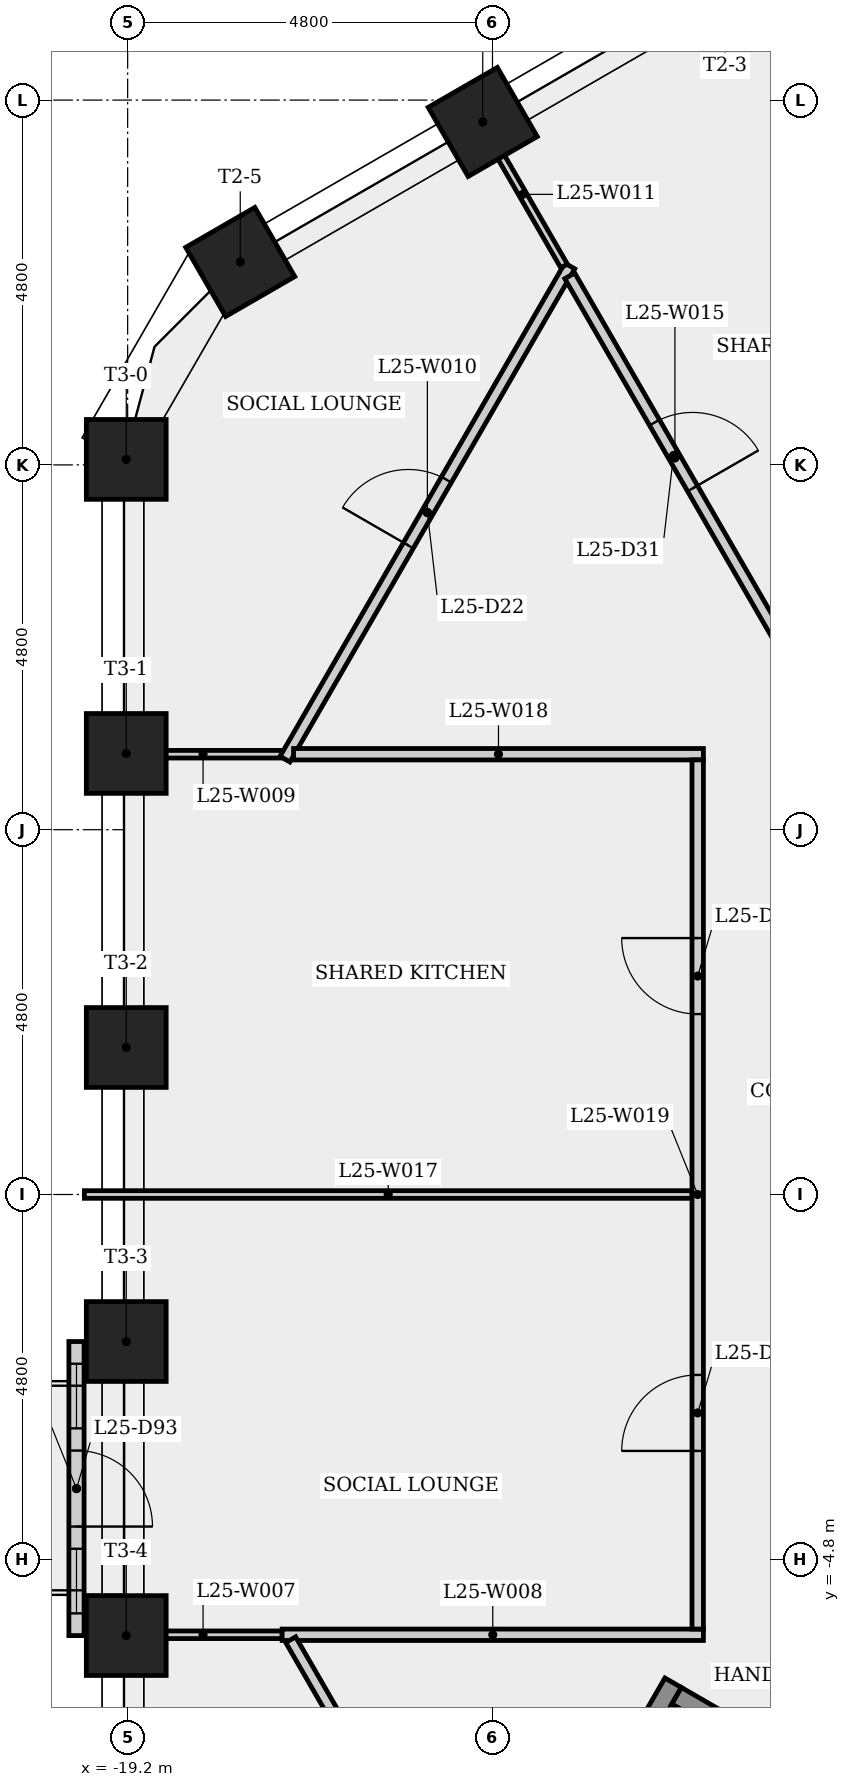
"""IFC4 building model, lengths in metres.
Left out: names, types, materials, properties, quantities, classifications, styles, units other than length and angle.
Written with IfcOpenShell. Run it as: python <this file> out.ifc"""

import sys

from ifc_helpers import new_model, si_unit, direction, frame, frame_2d, origin, origin_2d, place, context, subcontext, project, spatial, rectangle, extrude, element, fill, save


model = new_model("IFC4")
c1 = context("Model", 3, precision=1e-05, world=origin(), true_north=direction((0.0, 1.0)))
c2 = subcontext(c1, "Body", "Model", "MODEL_VIEW")
j1 = project(units=[si_unit("LENGTHUNIT", "METRE"), si_unit("PLANEANGLEUNIT", "RADIAN")], contexts=[c1])
p1 = place(None, origin())
s1 = spatial("IfcSite", under=j1, at=p1, CompositionType="ELEMENT")
p2 = place(p1, origin())
s2 = spatial("IfcBuilding", under=s1, at=p2, CompositionType="ELEMENT")
p3 = place(p2, frame((0.0, 0.0, 96.7)))
s3 = spatial("IfcBuildingStorey", under=s2, at=p3, CompositionType="ELEMENT", Elevation=96.7)
for number, where, z_axis, x_axis in (
    (1, (-14.528, 14.112, 0.0), (0.0, 0.0, 1.0), (-0.5, 0.866, 0.0)),
    (2, (-17.719, 12.27, 0.0), (0.0, 0.0, 1.0), (-0.5, 0.866, 0.0)),
    (3, (-19.219, 9.672, 0.0), (0.0, 0.0, 1.0), (-1.0, 0.0, 0.0)),
    (4, (-19.219, 5.803, 0.0), (0.0, 0.0, 1.0), (-1.0, 0.0, 0.0)),
    (5, (-19.219, 1.934, 0.0), (0.0, 0.0, 1.0), (-1.0, 0.0, 0.0)),
    (6, (-19.219, -1.934, 0.0), (0.0, 0.0, 1.0), (-1.0, 0.0, 0.0)),
    (7, (-19.219, -5.803, 0.0), (0.0, 0.0, 1.0), (-1.0, 0.0, 0.0)),
):
    element("IfcColumn", number, at=place(p3, frame(where, z_axis=z_axis, x_axis=x_axis)), inside=s3, PredefinedType="COLUMN", context=c2, shape_type="SweptSolid", body=[
        extrude(rectangle(XDim=1.05, YDim=1.05, at=origin_2d()), origin(), (0.0, 0.0, 1.0), 3.4),
    ])
p4 = place(p3, frame((-19.873, -1.935, 0.0), z_axis=(0.0, 0.0, 1.0), x_axis=(0.0, -1.0, 0.0)))
e8 = element("IfcWall", 8, at=p4, inside=s3, PredefinedType="SOLIDWALL", context=c2, shape_type="SweptSolid", body=[
    extrude(rectangle(XDim=3.869, YDim=0.2, at=frame_2d((1.935, 0.0))), origin(), (0.0, 0.0, 1.0), 3.4),
])
p5 = place(p4, frame((1.435, 0.0, 0.0)))
e9 = element("IfcOpeningElement", 9, at=p5, cuts=e8, PredefinedType="OPENING", context=c2, shape_type="SweptSolid", body=[
    extrude(rectangle(XDim=1.0, YDim=2.4, at=frame_2d((0.5, 1.2))), frame((0.0, 0.11, 0.0), z_axis=(0.0, -1.0, 0.0), x_axis=(1.0, 0.0, 0.0)), (0.0, 0.0, 1.0), 0.22),
])
p6 = place(p4, frame((0.292, 0.0, 0.9)))
e10 = element("IfcOpeningElement", 10, at=p6, cuts=e8, PredefinedType="OPENING", context=c2, shape_type="SweptSolid", body=[
    extrude(rectangle(XDim=0.85, YDim=1.5, at=frame_2d((0.425, 0.75))), frame((0.0, 0.11, 0.0), z_axis=(0.0, -1.0, 0.0), x_axis=(1.0, 0.0, 0.0)), (0.0, 0.0, 1.0), 0.22),
])
p7 = place(p4, frame((2.727, 0.0, 0.9)))
e11 = element("IfcOpeningElement", 11, at=p7, cuts=e8, PredefinedType="OPENING", context=c2, shape_type="SweptSolid", body=[
    extrude(rectangle(XDim=0.85, YDim=1.5, at=frame_2d((0.425, 0.75))), frame((0.0, 0.11, 0.0), z_axis=(0.0, -1.0, 0.0), x_axis=(1.0, 0.0, 0.0)), (0.0, 0.0, 1.0), 0.22),
])
p8 = place(p3, frame((-17.167, -5.793, 0.0), z_axis=(0.0, 0.0, 1.0), x_axis=(-1.0, 0.0, 0.0)))
e12 = element("IfcWall", 12, at=p8, inside=s3, PredefinedType="PARTITIONING", context=c2, shape_type="SweptSolid", body=[
    extrude(rectangle(XDim=2.081, YDim=0.1, at=frame_2d((1.041, 0.0))), origin(), (0.0, 0.0, 1.0), 3.05),
])
p9 = place(p3, frame((-17.167, -5.793, 0.0), z_axis=(0.0, 0.0, 1.0), x_axis=(1.0, 0.0, 0.0)))
e13 = element("IfcWall", 13, at=p9, inside=s3, PredefinedType="PARTITIONING", context=c2, shape_type="SweptSolid", body=[
    extrude(rectangle(XDim=5.542, YDim=0.15, at=frame_2d((2.771, 0.0))), origin(), (0.0, 0.0, 1.0), 3.05),
])
p10 = place(p3, frame((-17.167, 5.793, 0.0), z_axis=(0.0, 0.0, 1.0), x_axis=(-1.0, 0.0, 0.0)))
e14 = element("IfcWall", 14, at=p10, inside=s3, PredefinedType="PARTITIONING", context=c2, shape_type="SweptSolid", body=[
    extrude(rectangle(XDim=2.081, YDim=0.1, at=frame_2d((1.041, 0.0))), origin(), (0.0, 0.0, 1.0), 3.05),
])
p11 = place(p3, frame((-17.13, 5.728, 0.0), z_axis=(0.0, 0.0, 1.0), x_axis=(0.500011056795, 0.866019020047, 0.0)))
e15 = element("IfcWall", 15, at=p11, inside=s3, PredefinedType="PARTITIONING", context=c2, shape_type="SweptSolid", body=[
    extrude(rectangle(XDim=7.493, YDim=0.15, at=frame_2d((3.747, 0.0))), origin(), (0.0, 0.0, 1.0), 3.05),
])
p12 = place(p11, frame((3.247, 0.0, 0.0)))
e16 = element("IfcOpeningElement", 16, at=p12, cuts=e15, PredefinedType="OPENING", context=c2, shape_type="SweptSolid", body=[
    extrude(rectangle(XDim=1.0, YDim=2.1, at=frame_2d((0.5, 1.05))), frame((0.0, 0.085, 0.0), z_axis=(0.0, -1.0, 0.0), x_axis=(1.0, 0.0, 0.0)), (0.0, 0.0, 1.0), 0.17),
])
p13 = place(p3, frame((-14.546, 14.102, 0.0), z_axis=(0.0, 0.0, 1.0), x_axis=(0.500000893942, -0.866024887666, 0.0)))
e17 = element("IfcWall", 17, at=p13, inside=s3, PredefinedType="PARTITIONING", context=c2, shape_type="SweptSolid", body=[
    extrude(rectangle(XDim=2.176, YDim=0.1, at=frame_2d((1.088, 0.0))), origin(), (0.0, 0.0, 1.0), 3.05),
])
p14 = place(p3, frame((-14.338, -10.564, 0.0), z_axis=(0.0, 0.0, 1.0), x_axis=(-0.499985629884, 0.866033700216, 0.0)))
e18 = element("IfcWall", 18, at=p14, inside=s3, PredefinedType="PARTITIONING", context=c2, shape_type="SweptSolid", body=[
    extrude(rectangle(XDim=5.434, YDim=0.15, at=frame_2d((2.717, 0.0))), origin(), (0.0, 0.0, 1.0), 3.05),
])
p15 = place(p14, frame((2.254, 0.0, 0.0)))
e19 = element("IfcOpeningElement", 19, at=p15, cuts=e18, PredefinedType="OPENING", context=c2, shape_type="SweptSolid", body=[
    extrude(rectangle(XDim=1.0, YDim=2.1, at=frame_2d((0.5, 1.05))), frame((0.0, 0.085, 0.0), z_axis=(0.0, -1.0, 0.0), x_axis=(1.0, 0.0, 0.0)), (0.0, 0.0, 1.0), 0.17),
])
p16 = place(p3, frame((-13.648, -9.239, 0.0), z_axis=(0.0, 0.0, 1.0), x_axis=(0.500017246033, 0.866015446554, 0.0)))
e20 = element("IfcWall", 20, at=p16, inside=s3, PredefinedType="SHEAR", context=c2, shape_type="SweptSolid", body=[
    extrude(rectangle(XDim=3.25, YDim=0.25, at=frame_2d((1.625, 0.0))), origin(), (0.0, 0.0, 1.0), 3.05),
])
p17 = place(p3, frame((-13.383, 12.088, 0.0), z_axis=(0.0, 0.0, 1.0), x_axis=(0.499996101646, -0.866027654488, 0.0)))
e21 = element("IfcWall", 21, at=p17, inside=s3, PredefinedType="PARTITIONING", context=c2, shape_type="SweptSolid", body=[
    extrude(rectangle(XDim=5.535, YDim=0.15, at=frame_2d((2.767, 0.0))), origin(), (0.0, 0.0, 1.0), 3.05),
])
p18 = place(p17, frame((2.23, 0.0, 0.0)))
e22 = element("IfcOpeningElement", 22, at=p18, cuts=e21, PredefinedType="OPENING", context=c2, shape_type="SweptSolid", body=[
    extrude(rectangle(XDim=1.0, YDim=2.1, at=frame_2d((0.5, 1.05))), frame((0.0, 0.085, 0.0), z_axis=(0.0, -1.0, 0.0), x_axis=(1.0, 0.0, 0.0)), (0.0, 0.0, 1.0), 0.17),
])
p19 = place(p3, frame((-11.977, -6.595, 0.0), z_axis=(0.0, 0.0, 1.0), x_axis=(0.866025499775, -0.499999833739, 0.0)))
e23 = element("IfcWall", 23, at=p19, inside=s3, PredefinedType="SHEAR", context=c2, shape_type="SweptSolid", body=[
    extrude(rectangle(XDim=6.4, YDim=0.25, at=frame_2d((3.2, 0.0))), origin(), (0.0, 0.0, 1.0), 3.05),
])
p20 = place(p19, frame((5.025, 0.0, 0.0)))
e24 = element("IfcOpeningElement", 24, at=p20, cuts=e23, PredefinedType="OPENING", context=c2, shape_type="SweptSolid", body=[
    extrude(rectangle(XDim=1.0, YDim=2.1, at=frame_2d((0.5, 1.05))), frame((0.0, 0.135, 0.0), z_axis=(0.0, -1.0, 0.0), x_axis=(1.0, 0.0, 0.0)), (0.0, 0.0, 1.0), 0.27),
])
p21 = place(p3, frame((-11.775, 0.0, 0.0), z_axis=(0.0, 0.0, 1.0), x_axis=(-1.0, 0.0, 0.0)))
e25 = element("IfcWall", 25, at=p21, inside=s3, PredefinedType="PARTITIONING", context=c2, shape_type="SweptSolid", body=[
    extrude(rectangle(XDim=7.994, YDim=0.1, at=frame_2d((3.997, 0.0))), origin(), (0.0, 0.0, 1.0), 3.05),
])
p22 = place(p3, frame((-11.625, 5.793, 0.0), z_axis=(0.0, 0.0, 1.0), x_axis=(-1.0, 0.0, 0.0)))
e26 = element("IfcWall", 26, at=p22, inside=s3, PredefinedType="PARTITIONING", context=c2, shape_type="SweptSolid", body=[
    extrude(rectangle(XDim=5.392, YDim=0.15, at=frame_2d((2.696, 0.0))), origin(), (0.0, 0.0, 1.0), 3.05),
])
p23 = place(p3, frame((-11.7, -5.718, 0.0), z_axis=(0.0, 0.0, 1.0), x_axis=(0.0, 1.0, 0.0)))
e27 = element("IfcWall", 27, at=p23, inside=s3, PredefinedType="PARTITIONING", context=c2, shape_type="SweptSolid", body=[
    extrude(rectangle(XDim=11.436, YDim=0.15, at=frame_2d((5.718, 0.0))), origin(), (0.0, 0.0, 1.0), 3.05),
])
p24 = place(p23, frame((8.092, 0.0, 0.0)))
e28 = element("IfcOpeningElement", 28, at=p24, cuts=e27, PredefinedType="OPENING", context=c2, shape_type="SweptSolid", body=[
    extrude(rectangle(XDim=1.0, YDim=2.1, at=frame_2d((0.5, 1.05))), frame((0.0, 0.085, 0.0), z_axis=(0.0, -1.0, 0.0), x_axis=(1.0, 0.0, 0.0)), (0.0, 0.0, 1.0), 0.17),
])
p25 = place(p23, frame((2.344, 0.0, 0.0)))
e29 = element("IfcOpeningElement", 29, at=p25, cuts=e27, PredefinedType="OPENING", context=c2, shape_type="SweptSolid", body=[
    extrude(rectangle(XDim=1.0, YDim=2.1, at=frame_2d((0.5, 1.05))), frame((0.0, 0.085, 0.0), z_axis=(0.0, -1.0, 0.0), x_axis=(1.0, 0.0, 0.0)), (0.0, 0.0, 1.0), 0.17),
])
p26 = place(p3, frame((-6.976, 9.569, 0.0), z_axis=(0.0, 0.0, 1.0), x_axis=(-0.499997453958, 0.866026873738, 0.0)))
e30 = element("IfcWall", 30, at=p26, inside=s3, PredefinedType="PARTITIONING", context=c2, shape_type="SweptSolid", body=[
    extrude(rectangle(XDim=7.71, YDim=0.1, at=frame_2d((3.855, 0.0))), origin(), (0.0, 0.0, 1.0), 3.05),
])
p27 = place(p5, origin())
e31 = element("IfcDoor", 31, at=p27, inside=s3, OperationType="SINGLE_SWING_RIGHT", PredefinedType="DOOR", context=c2, shape_type="SweptSolid", body=[
    extrude(rectangle(XDim=1.0, YDim=2.4, at=frame_2d((0.5, 1.2))), frame((0.0, 0.025, 0.0), z_axis=(0.0, -1.0, 0.0), x_axis=(1.0, 0.0, 0.0)), (0.0, 0.0, 1.0), 0.05),
])
fill(e9, e31)
p28 = place(p6, origin())
e32 = element("IfcWindow", 32, at=p28, inside=s3, PartitioningType="SINGLE_PANEL", PredefinedType="WINDOW", context=c2, shape_type="SweptSolid", body=[
    extrude(rectangle(XDim=0.85, YDim=1.5, at=frame_2d((0.425, 0.75))), frame((0.0, 0.03, 0.0), z_axis=(0.0, -1.0, 0.0), x_axis=(1.0, 0.0, 0.0)), (0.0, 0.0, 1.0), 0.06),
])
fill(e10, e32)
p29 = place(p7, origin())
e33 = element("IfcWindow", 33, at=p29, inside=s3, PartitioningType="SINGLE_PANEL", PredefinedType="WINDOW", context=c2, shape_type="SweptSolid", body=[
    extrude(rectangle(XDim=0.85, YDim=1.5, at=frame_2d((0.425, 0.75))), frame((0.0, 0.03, 0.0), z_axis=(0.0, -1.0, 0.0), x_axis=(1.0, 0.0, 0.0)), (0.0, 0.0, 1.0), 0.06),
])
fill(e11, e33)
p30 = place(p12, origin())
e34 = element("IfcDoor", 34, at=p30, inside=s3, OperationType="SINGLE_SWING_LEFT", PredefinedType="DOOR", context=c2, shape_type="SweptSolid", body=[
    extrude(rectangle(XDim=1.0, YDim=2.1, at=frame_2d((0.5, 1.05))), frame((0.0, 0.025, 0.0), z_axis=(0.0, -1.0, 0.0), x_axis=(1.0, 0.0, 0.0)), (0.0, 0.0, 1.0), 0.05),
])
fill(e16, e34)
p31 = place(p24, origin())
e35 = element("IfcDoor", 35, at=p31, inside=s3, OperationType="SINGLE_SWING_RIGHT", PredefinedType="DOOR", context=c2, shape_type="SweptSolid", body=[
    extrude(rectangle(XDim=1.0, YDim=2.1, at=frame_2d((0.5, 1.05))), frame((0.0, 0.025, 0.0), z_axis=(0.0, -1.0, 0.0), x_axis=(1.0, 0.0, 0.0)), (0.0, 0.0, 1.0), 0.05),
])
fill(e28, e35)
p32 = place(p25, origin())
e36 = element("IfcDoor", 36, at=p32, inside=s3, OperationType="SINGLE_SWING_LEFT", PredefinedType="DOOR", context=c2, shape_type="SweptSolid", body=[
    extrude(rectangle(XDim=1.0, YDim=2.1, at=frame_2d((0.5, 1.05))), frame((0.0, 0.025, 0.0), z_axis=(0.0, -1.0, 0.0), x_axis=(1.0, 0.0, 0.0)), (0.0, 0.0, 1.0), 0.05),
])
fill(e29, e36)
p33 = place(p18, origin())
e37 = element("IfcDoor", 37, at=p33, inside=s3, OperationType="SINGLE_SWING_RIGHT", PredefinedType="DOOR", context=c2, shape_type="SweptSolid", body=[
    extrude(rectangle(XDim=1.0, YDim=2.1, at=frame_2d((0.5, 1.05))), frame((0.0, 0.025, 0.0), z_axis=(0.0, -1.0, 0.0), x_axis=(1.0, 0.0, 0.0)), (0.0, 0.0, 1.0), 0.05),
])
fill(e22, e37)
save(model, sys.argv[1])
